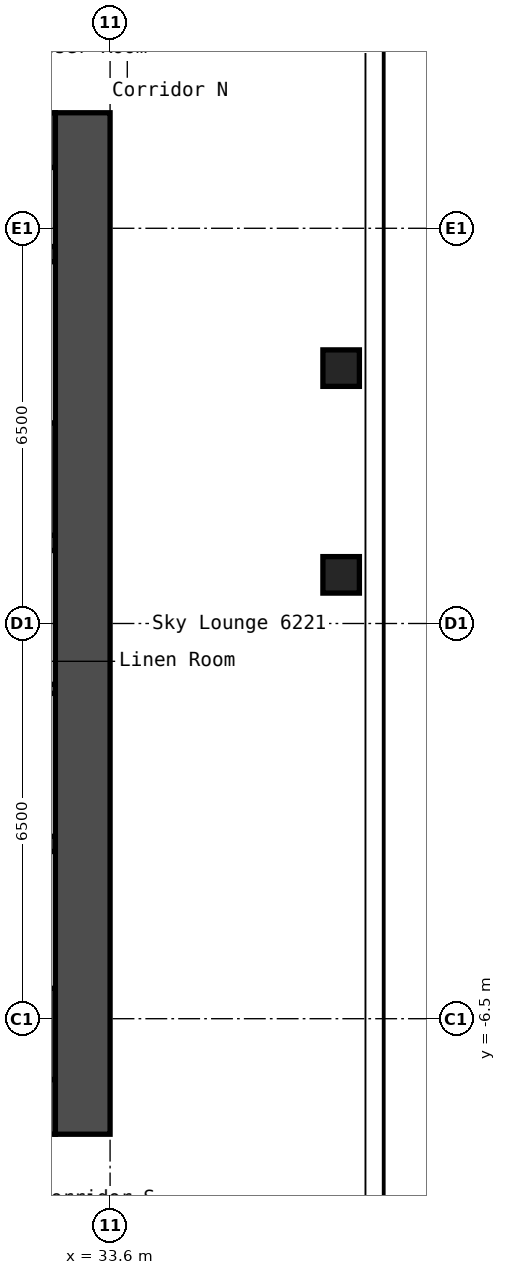
"""IFC4 building model, lengths in metres.
Left out: names, types, materials, properties, quantities, classifications, styles, units other than length and angle.
Written with IfcOpenShell. Run it as: python <this file> out.ifc"""

import sys

from ifc_helpers import new_model, si_unit, direction, frame, frame_2d, origin, origin_2d, place, context, subcontext, project, spatial, rectangle, hollow_rectangle, extrude, element, save


model = new_model("IFC4")
c1 = context("Model", 3, precision=1e-05, world=origin(), true_north=direction((0.0, 1.0)))
c2 = subcontext(c1, "Body", "Model", "MODEL_VIEW")
j1 = project(units=[si_unit("LENGTHUNIT", "METRE"), si_unit("PLANEANGLEUNIT", "RADIAN")], contexts=[c1])
p1 = place(None, origin())
s1 = spatial("IfcSite", under=j1, at=p1, CompositionType="ELEMENT")
p2 = place(p1, origin())
s2 = spatial("IfcBuilding", under=s1, at=p2, CompositionType="ELEMENT")
p3 = place(p2, frame((0.0, 0.0, 218.6)))
s3 = spatial("IfcBuildingStorey", under=s2, at=p3, CompositionType="ELEMENT", Elevation=218.6)
for number, where, z_axis, x_axis in (
    (1, (37.4, 0.8, 0.0), (0.0, 0.0, 1.0), (1.0, 0.0, 0.0)),
    (2, (37.4, 4.2, 0.0), (0.0, 0.0, 1.0), (1.0, 0.0, 0.0)),
):
    element("IfcColumn", number, at=place(p3, frame(where, z_axis=z_axis, x_axis=x_axis)), inside=s3, PredefinedType="COLUMN", context=c2, shape_type="SweptSolid", body=[
        extrude(hollow_rectangle(XDim=0.6, YDim=0.6, WallThickness=0.025, InnerFilletRadius=0.038, OuterFilletRadius=0.062, at=origin_2d()), origin(), (0.0, 0.0, 1.0), 2.75),
    ])
p4 = place(p3, frame((33.15, -8.4, 0.0), z_axis=(0.0, 0.0, 1.0), x_axis=(0.0, 1.0, 0.0)))
e3 = element("IfcWall", 3, at=p4, inside=s3, PredefinedType="SHEAR", context=c2, shape_type="SweptSolid", body=[
    extrude(rectangle(XDim=16.8, YDim=0.9, at=frame_2d((8.4, 0.0))), origin(), (0.0, 0.0, 1.0), 2.75),
])
p5 = place(p3, frame((17.7, 7.95, 0.0), z_axis=(0.0, 0.0, 1.0), x_axis=(1.0, 0.0, 0.0)))
e4 = element("IfcWall", 4, at=p5, inside=s3, PredefinedType="SHEAR", context=c2, shape_type="SweptSolid", body=[
    extrude(rectangle(XDim=15.0, YDim=0.9, at=frame_2d((7.5, 0.0))), origin(), (0.0, 0.0, 1.0), 2.75),
])
p6 = place(p5, frame((10.4, 0.0, 0.0)))
e5 = element("IfcOpeningElement", 5, at=p6, cuts=e4, PredefinedType="OPENING", context=c2, shape_type="SweptSolid", body=[
    extrude(rectangle(XDim=1.2, YDim=2.1, at=frame_2d((0.6, 1.05))), frame((0.0, 0.46, 0.0), z_axis=(0.0, -1.0, 0.0), x_axis=(1.0, 0.0, 0.0)), (0.0, 0.0, 1.0), 0.92),
])
p7 = place(p5, frame((13.35, 0.0, 0.0)))
e6 = element("IfcOpeningElement", 6, at=p7, cuts=e4, PredefinedType="OPENING", context=c2, shape_type="SweptSolid", body=[
    extrude(rectangle(XDim=0.9, YDim=2.1, at=frame_2d((0.45, 1.05))), frame((0.0, 0.46, 0.0), z_axis=(0.0, -1.0, 0.0), x_axis=(1.0, 0.0, 0.0)), (0.0, 0.0, 1.0), 0.92),
])
p8 = place(p3, frame((17.7, -7.95, 0.0), z_axis=(0.0, 0.0, 1.0), x_axis=(1.0, 0.0, 0.0)))
e7 = element("IfcWall", 7, at=p8, inside=s3, PredefinedType="SHEAR", context=c2, shape_type="SweptSolid", body=[
    extrude(rectangle(XDim=15.0, YDim=0.9, at=frame_2d((7.5, 0.0))), origin(), (0.0, 0.0, 1.0), 2.75),
])
p9 = place(p8, frame((2.55, 0.0, 0.0)))
e8 = element("IfcOpeningElement", 8, at=p9, cuts=e7, PredefinedType="OPENING", context=c2, shape_type="SweptSolid", body=[
    extrude(rectangle(XDim=1.0, YDim=2.1, at=frame_2d((0.5, 1.05))), frame((0.0, 0.46, 0.0), z_axis=(0.0, -1.0, 0.0), x_axis=(1.0, 0.0, 0.0)), (0.0, 0.0, 1.0), 0.92),
])
p10 = place(p3, frame((27.65, 1.325, 0.0), z_axis=(0.0, 0.0, 1.0), x_axis=(1.0, 0.0, 0.0)))
e9 = element("IfcWall", 9, at=p10, inside=s3, PredefinedType="SHEAR", context=c2, shape_type="SweptSolid", body=[
    extrude(rectangle(XDim=5.05, YDim=0.25, at=frame_2d((2.525, 0.0))), origin(), (0.0, 0.0, 1.0), 2.75),
])
p11 = place(p10, frame((0.55, 0.0, 0.0)))
e10 = element("IfcOpeningElement", 10, at=p11, cuts=e9, PredefinedType="OPENING", context=c2, shape_type="SweptSolid", body=[
    extrude(rectangle(XDim=1.2, YDim=2.1, at=frame_2d((0.6, 1.05))), frame((0.0, 0.135, 0.0), z_axis=(0.0, -1.0, 0.0), x_axis=(1.0, 0.0, 0.0)), (0.0, 0.0, 1.0), 0.27),
])
p12 = place(p3, frame((30.3, 2.375, 0.0), z_axis=(0.0, 0.0, 1.0), x_axis=(1.0, 0.0, 0.0)))
e11 = element("IfcWall", 11, at=p12, inside=s3, PredefinedType="SHEAR", context=c2, shape_type="SweptSolid", body=[
    extrude(rectangle(XDim=2.4, YDim=1.85, at=frame_2d((1.2, 0.0))), origin(), (0.0, 0.0, 1.0), 2.75),
])
p13 = place(p3, frame((30.3, 6.075, 0.0), z_axis=(0.0, 0.0, 1.0), x_axis=(1.0, 0.0, 0.0)))
e12 = element("IfcWall", 12, at=p13, inside=s3, PredefinedType="SHEAR", context=c2, shape_type="SweptSolid", body=[
    extrude(rectangle(XDim=2.4, YDim=0.25, at=frame_2d((1.2, 0.0))), origin(), (0.0, 0.0, 1.0), 2.75),
])
p14 = place(p3, frame((28.15, -3.625, 0.0), z_axis=(0.0, 0.0, 1.0), x_axis=(1.0, 0.0, 0.0)))
e13 = element("IfcWall", 13, at=p14, inside=s3, PredefinedType="SHEAR", context=c2, shape_type="SweptSolid", body=[
    extrude(rectangle(XDim=4.55, YDim=0.25, at=frame_2d((2.275, 0.0))), origin(), (0.0, 0.0, 1.0), 2.75),
])
p15 = place(p3, frame((28.15, -6.75, 0.0), z_axis=(0.0, 0.0, 1.0), x_axis=(1.0, 0.0, 0.0)))
e14 = element("IfcWall", 14, at=p15, inside=s3, PredefinedType="SHEAR", context=c2, shape_type="SweptSolid", body=[
    extrude(rectangle(XDim=4.55, YDim=1.5, at=frame_2d((2.275, 0.0))), origin(), (0.0, 0.0, 1.0), 2.75),
])
p16 = place(p3, frame((29.7, -1.075, 0.0), z_axis=(0.0, 0.0, 1.0), x_axis=(1.0, 0.0, 0.0)))
e15 = element("IfcWall", 15, at=p16, inside=s3, PredefinedType="PARTITIONING", context=c2, shape_type="SweptSolid", body=[
    extrude(rectangle(XDim=3.0, YDim=0.15, at=frame_2d((1.5, 0.0))), origin(), (0.0, 0.0, 1.0), 2.75),
])
save(model, sys.argv[1])
